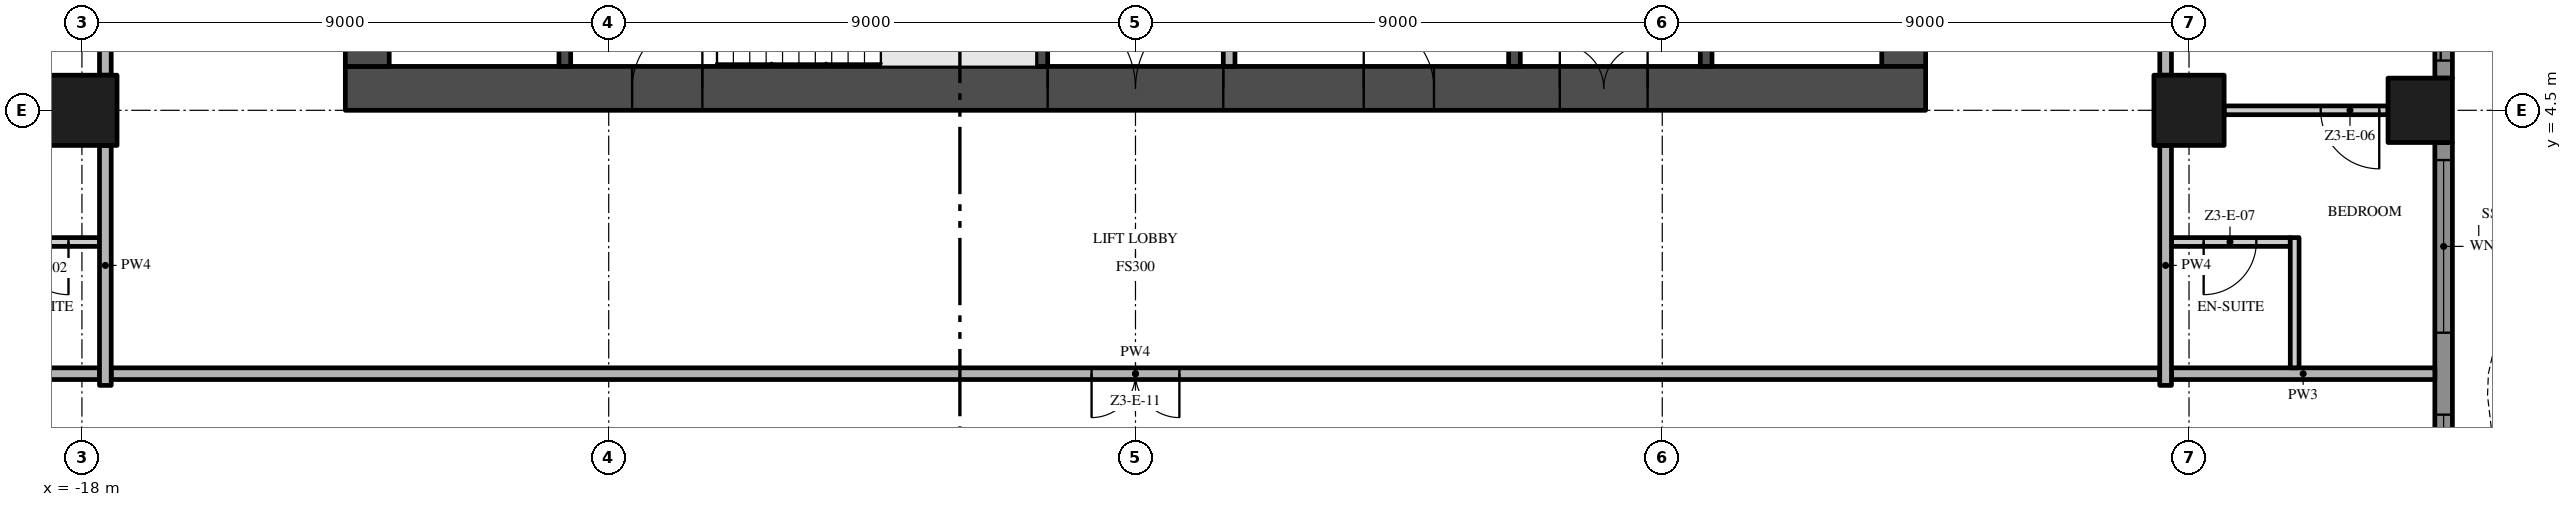
"""IFC4 building model, lengths in metres.
Left out: names, types, materials, properties, quantities, classifications, styles, units other than length and angle.
Written with IfcOpenShell. Run it as: python <this file> out.ifc"""

import sys

from ifc_helpers import new_model, si_unit, direction, frame, frame_2d, origin, origin_2d, place, context, subcontext, project, spatial, polyline, rectangle, outline, extrude, element, fill, save


model = new_model("IFC4")
c1 = context("Model", 3, precision=1e-05, world=origin(), true_north=direction((0.0, 1.0)))
c2 = subcontext(c1, "Body", "Model", "MODEL_VIEW")
j1 = project(units=[si_unit("LENGTHUNIT", "METRE"), si_unit("PLANEANGLEUNIT", "RADIAN")], contexts=[c1])
p1 = place(None, origin())
s1 = spatial("IfcSite", under=j1, at=p1, CompositionType="ELEMENT")
p2 = place(p1, origin())
s2 = spatial("IfcBuilding", under=s1, at=p2, CompositionType="ELEMENT")
p3 = place(p2, frame((0.0, 0.0, 170.6)))
s3 = spatial("IfcBuildingStorey", under=s2, at=p3, CompositionType="ELEMENT", Elevation=170.6)
p4 = place(p3, frame((-13.5, 4.875, -0.3), z_axis=(0.0, 0.0, 1.0), x_axis=(1.0, 0.0, 0.0)))
e1 = element("IfcWall", 1, at=p4, inside=s3, PredefinedType="SHEAR", context=c2, shape_type="SweptSolid", body=[
    extrude(rectangle(XDim=27.0, YDim=0.75, at=frame_2d((13.5, 0.0))), origin(), (0.0, 0.0, 1.0), 3.8),
])
p5 = place(p4, frame((12.0, 0.0, 0.3)))
e2 = element("IfcOpeningElement", 2, at=p5, cuts=e1, PredefinedType="OPENING", context=c2, shape_type="SweptSolid", body=[
    extrude(rectangle(XDim=3.0, YDim=2.4, at=frame_2d((1.5, 1.2))), frame((0.0, 0.385, 0.0), z_axis=(0.0, -1.0, 0.0), x_axis=(1.0, 0.0, 0.0)), (0.0, 0.0, 1.0), 0.77),
])
p6 = place(p4, frame((4.9, 0.0, 0.3)))
e3 = element("IfcOpeningElement", 3, at=p6, cuts=e1, PredefinedType="OPENING", context=c2, shape_type="SweptSolid", body=[
    extrude(rectangle(XDim=1.2, YDim=2.2, at=frame_2d((0.6, 1.1))), frame((0.0, 0.385, 0.0), z_axis=(0.0, -1.0, 0.0), x_axis=(1.0, 0.0, 0.0)), (0.0, 0.0, 1.0), 0.77),
])
p7 = place(p4, frame((20.75, 0.0, 0.3)))
e4 = element("IfcOpeningElement", 4, at=p7, cuts=e1, PredefinedType="OPENING", context=c2, shape_type="SweptSolid", body=[
    extrude(rectangle(XDim=1.5, YDim=2.2, at=frame_2d((0.75, 1.1))), frame((0.0, 0.385, 0.0), z_axis=(0.0, -1.0, 0.0), x_axis=(1.0, 0.0, 0.0)), (0.0, 0.0, 1.0), 0.77),
])
p8 = place(p4, frame((17.4, 0.0, 0.3)))
e5 = element("IfcOpeningElement", 5, at=p8, cuts=e1, PredefinedType="OPENING", context=c2, shape_type="SweptSolid", body=[
    extrude(rectangle(XDim=1.2, YDim=2.2, at=frame_2d((0.6, 1.1))), frame((0.0, 0.385, 0.0), z_axis=(0.0, -1.0, 0.0), x_axis=(1.0, 0.0, 0.0)), (0.0, 0.0, 1.0), 0.77),
])
p9 = place(p3, frame((13.125, 5.25, -0.3), z_axis=(0.0, 0.0, 1.0), x_axis=(0.0, 1.0, 0.0)))
e6 = element("IfcWall", 6, at=p9, inside=s3, PredefinedType="SHEAR", context=c2, shape_type="SweptSolid", body=[
    extrude(rectangle(XDim=16.5, YDim=0.75, at=frame_2d((8.25, 0.0))), origin(), (0.0, 0.0, 1.0), 3.8),
])
p10 = place(p9, frame((6.15, 0.0, 0.3)))
e7 = element("IfcOpeningElement", 7, at=p10, cuts=e6, PredefinedType="OPENING", context=c2, shape_type="SweptSolid", body=[
    extrude(rectangle(XDim=1.2, YDim=2.2, at=frame_2d((0.6, 1.1))), frame((0.0, 0.385, 0.0), z_axis=(0.0, -1.0, 0.0), x_axis=(1.0, 0.0, 0.0)), (0.0, 0.0, 1.0), 0.77),
])
p11 = place(p3, frame((-13.125, 21.75, -0.3), z_axis=(0.0, 0.0, 1.0), x_axis=(0.0, -1.0, 0.0)))
e8 = element("IfcWall", 8, at=p11, inside=s3, PredefinedType="SHEAR", context=c2, shape_type="SweptSolid", body=[
    extrude(rectangle(XDim=16.5, YDim=0.75, at=frame_2d((8.25, 0.0))), origin(), (0.0, 0.0, 1.0), 3.8),
])
p12 = place(p11, frame((9.15, 0.0, 0.3)))
e9 = element("IfcOpeningElement", 9, at=p12, cuts=e8, PredefinedType="OPENING", context=c2, shape_type="SweptSolid", body=[
    extrude(rectangle(XDim=1.2, YDim=2.2, at=frame_2d((0.6, 1.1))), frame((0.0, 0.385, 0.0), z_axis=(0.0, -1.0, 0.0), x_axis=(1.0, 0.0, 0.0)), (0.0, 0.0, 1.0), 0.77),
])
for number, where, z_axis, x_axis in (
    (10, (-18.0, 4.5, 0.0), (0.0, 0.0, 1.0), (1.0, 0.0, 0.0)),
    (11, (18.0, 4.5, 0.0), (0.0, 0.0, 1.0), (1.0, 0.0, 0.0)),
):
    element("IfcColumn", number, at=place(p3, frame(where, z_axis=z_axis, x_axis=x_axis)), inside=s3, PredefinedType="COLUMN", context=c2, shape_type="SweptSolid", body=[
        extrude(rectangle(XDim=1.2, YDim=1.2, at=origin_2d()), origin(), (0.0, 0.0, 1.0), 3.5),
    ])
p13 = place(p3, frame((21.95, 4.5, 0.0), z_axis=(0.0, 0.0, 1.0), x_axis=(1.0, 0.0, 0.0)))
e12 = element("IfcColumn", 12, at=p13, inside=s3, PredefinedType="COLUMN", context=c2, shape_type="SweptSolid", body=[
    extrude(rectangle(XDim=1.1, YDim=1.1, at=origin_2d()), origin(), (0.0, 0.0, 1.0), 3.5),
])
p14 = place(p3, frame((22.35, 3.95, 0.0), z_axis=(0.0, 0.0, 1.0), x_axis=(0.0, -1.0, 0.0)))
e13 = element("IfcWall", 13, at=p14, inside=s3, PredefinedType="SOLIDWALL", context=c2, shape_type="SweptSolid", body=[
    extrude(rectangle(XDim=7.9, YDim=0.3, at=frame_2d((3.95, 0.0))), origin(), (0.0, 0.0, 1.0), 3.5),
])
p15 = place(p14, frame((4.65, 0.0, 0.45)))
e14 = element("IfcOpeningElement", 14, at=p15, cuts=e13, PredefinedType="OPENING", context=c2, shape_type="SweptSolid", body=[
    extrude(rectangle(XDim=2.95, YDim=2.65, at=frame_2d((1.475, 1.325))), frame((0.0, 0.16, 0.0), z_axis=(0.0, -1.0, 0.0), x_axis=(1.0, 0.0, 0.0)), (0.0, 0.0, 1.0), 0.32),
])
p16 = place(p14, frame((0.3, 0.0, 0.45)))
e15 = element("IfcOpeningElement", 15, at=p16, cuts=e13, PredefinedType="OPENING", context=c2, shape_type="SweptSolid", body=[
    extrude(rectangle(XDim=2.95, YDim=2.65, at=frame_2d((1.475, 1.325))), frame((0.0, 0.16, 0.0), z_axis=(0.0, -1.0, 0.0), x_axis=(1.0, 0.0, 0.0)), (0.0, 0.0, 1.0), 0.32),
])
p17 = place(p3, frame((22.35, 12.95, 0.0), z_axis=(0.0, 0.0, 1.0), x_axis=(0.0, -1.0, 0.0)))
e16 = element("IfcWall", 16, at=p17, inside=s3, PredefinedType="SOLIDWALL", context=c2, shape_type="SweptSolid", body=[
    extrude(rectangle(XDim=7.9, YDim=0.3, at=frame_2d((3.95, 0.0))), origin(), (0.0, 0.0, 1.0), 3.5),
])
p18 = place(p17, frame((4.65, 0.0, 0.0)))
e17 = element("IfcOpeningElement", 17, at=p18, cuts=e16, PredefinedType="OPENING", context=c2, shape_type="SweptSolid", body=[
    extrude(rectangle(XDim=2.95, YDim=2.4, at=frame_2d((1.475, 1.2))), frame((0.0, 0.16, 0.0), z_axis=(0.0, -1.0, 0.0), x_axis=(1.0, 0.0, 0.0)), (0.0, 0.0, 1.0), 0.32),
])
p19 = place(p17, frame((0.3, 0.0, 0.45)))
e18 = element("IfcOpeningElement", 18, at=p19, cuts=e16, PredefinedType="OPENING", context=c2, shape_type="SweptSolid", body=[
    extrude(rectangle(XDim=2.95, YDim=2.65, at=frame_2d((1.475, 1.325))), frame((0.0, 0.16, 0.0), z_axis=(0.0, -1.0, 0.0), x_axis=(1.0, 0.0, 0.0)), (0.0, 0.0, 1.0), 0.32),
])
p20 = place(p3, origin())
e19 = element("IfcWall", 19, at=p20, inside=s3, PredefinedType="USERDEFINED", context=c2, shape_type="SweptSolid", body=[
    extrude(outline(polyline([(23.451, -13.5), (24.112, -12.0), (24.845, -10.5), (25.369, -9.0), (25.5, -7.875), (25.485, -7.5), (25.149, -6.0), (24.488, -4.5), (23.755, -3.0), (23.231, -1.5), (23.1, -0.375), (23.115, 0.0), (23.451, 1.5), (24.112, 3.0), (24.845, 4.5), (25.369, 6.0), (25.5, 7.125), (25.485, 7.5), (25.149, 9.0), (24.488, 10.5), (23.755, 12.0), (23.231, 13.5), (23.1, 14.625), (23.115, 15.0), (23.451, 16.5), (24.112, 18.0), (23.883, 18.101), (23.213, 16.579), (22.866, 15.033), (22.849, 14.615), (22.986, 13.444), (23.524, 11.904), (24.261, 10.395), (24.91, 8.921), (25.236, 7.467), (25.249, 7.135), (25.124, 6.056), (24.614, 4.596), (23.885, 3.105), (23.213, 1.579), (22.866, 0.033), (22.849, -0.385), (22.986, -1.556), (23.524, -3.096), (24.261, -4.605), (24.91, -6.079), (25.236, -7.533), (25.249, -7.865), (25.124, -8.944), (24.614, -10.404), (23.885, -11.895), (23.223, -13.399), (23.451, -13.5)])), origin(), (0.0, 0.0, 1.0), 0.9),
])
for number, where, z_axis, x_axis in (
    (20, (-9.75, 5.25, 0.0), (0.0, 0.0, 1.0), (0.0, 1.0, 0.0)),
    (21, (-1.6, 5.25, 0.0), (0.0, 0.0, 1.0), (0.0, 1.0, 0.0)),
):
    element("IfcWall", number, at=place(p3, frame(where, z_axis=z_axis, x_axis=x_axis)), inside=s3, PredefinedType="SHEAR", context=c2, shape_type="SweptSolid", body=[
        extrude(rectangle(XDim=2.7, YDim=0.2, at=frame_2d((1.35, 0.0))), origin(), (0.0, 0.0, 1.0), 3.5),
    ])
p21 = place(p3, frame((1.6, 7.5, 0.0), z_axis=(0.0, 0.0, 1.0), x_axis=(0.0, -1.0, 0.0)))
e22 = element("IfcWall", 22, at=p21, inside=s3, PredefinedType="PARTITIONING", context=c2, shape_type="SweptSolid", body=[
    extrude(rectangle(XDim=2.25, YDim=0.2, at=frame_2d((1.125, 0.0))), origin(), (0.0, 0.0, 1.0), 3.5),
])
p22 = place(p21, frame((0.275, 0.0, 0.0)))
e23 = element("IfcOpeningElement", 23, at=p22, cuts=e22, PredefinedType="OPENING", context=c2, shape_type="SweptSolid", body=[
    extrude(rectangle(XDim=0.9, YDim=2.1, at=frame_2d((0.45, 1.05))), frame((0.0, 0.11, 0.0), z_axis=(0.0, -1.0, 0.0), x_axis=(1.0, 0.0, 0.0)), (0.0, 0.0, 1.0), 0.22),
])
p23 = place(p3, frame((6.475, 5.25, 0.0), z_axis=(0.0, 0.0, 1.0), x_axis=(0.0, 1.0, 0.0)))
e24 = element("IfcWall", 24, at=p23, inside=s3, PredefinedType="SHEAR", context=c2, shape_type="SweptSolid", body=[
    extrude(rectangle(XDim=2.25, YDim=0.2, at=frame_2d((1.125, 0.0))), origin(), (0.0, 0.0, 1.0), 3.5),
])
p24 = place(p3, frame((9.75, 5.25, 0.0), z_axis=(0.0, 0.0, 1.0), x_axis=(0.0, 1.0, 0.0)))
e25 = element("IfcWall", 25, at=p24, inside=s3, PredefinedType="SHEAR", context=c2, shape_type="SweptSolid", body=[
    extrude(rectangle(XDim=2.35, YDim=0.2, at=frame_2d((1.175, 0.0))), origin(), (0.0, 0.0, 1.0), 3.5),
])
p25 = place(p24, frame((0.7, 0.0, 0.0)))
e26 = element("IfcOpeningElement", 26, at=p25, cuts=e25, PredefinedType="OPENING", context=c2, shape_type="SweptSolid", body=[
    extrude(rectangle(XDim=1.1, YDim=2.1, at=frame_2d((0.55, 1.05))), frame((0.0, 0.11, 0.0), z_axis=(0.0, -1.0, 0.0), x_axis=(1.0, 0.0, 0.0)), (0.0, 0.0, 1.0), 0.22),
])
p26 = place(p3, frame((17.5, 0.0, 0.0), z_axis=(0.0, 0.0, 1.0), x_axis=(-1.0, 0.0, 0.0)))
e27 = element("IfcWall", 27, at=p26, inside=s3, PredefinedType="PARTITIONING", context=c2, shape_type="SweptSolid", body=[
    extrude(rectangle(XDim=35.0, YDim=0.2, at=frame_2d((17.5, 0.0))), origin(), (0.0, 0.0, 1.0), 3.5),
])
p27 = place(p26, frame((16.75, 0.0, 0.0)))
e28 = element("IfcOpeningElement", 28, at=p27, cuts=e27, PredefinedType="OPENING", context=c2, shape_type="SweptSolid", body=[
    extrude(rectangle(XDim=1.5, YDim=2.4, at=frame_2d((0.75, 1.2))), frame((0.0, 0.11, 0.0), z_axis=(0.0, -1.0, 0.0), x_axis=(1.0, 0.0, 0.0)), (0.0, 0.0, 1.0), 0.22),
])
for number, where, z_axis, x_axis in (
    (29, (-22.2, 0.0, 0.0), (0.0, 0.0, 1.0), (1.0, 0.0, 0.0)),
    (30, (17.7, 0.0, 0.0), (0.0, 0.0, 1.0), (1.0, 0.0, 0.0)),
):
    element("IfcWall", number, at=place(p3, frame(where, z_axis=z_axis, x_axis=x_axis)), inside=s3, PredefinedType="PARTITIONING", context=c2, shape_type="SweptSolid", body=[
        extrude(rectangle(XDim=4.5, YDim=0.2, at=frame_2d((2.25, 0.0))), origin(), (0.0, 0.0, 1.0), 3.5),
    ])
p28 = place(p3, frame((-17.7, 2.25, 0.0), z_axis=(0.0, 0.0, 1.0), x_axis=(-1.0, 0.0, 0.0)))
e31 = element("IfcWall", 31, at=p28, inside=s3, PredefinedType="PARTITIONING", context=c2, shape_type="SweptSolid", body=[
    extrude(rectangle(XDim=2.03, YDim=0.15, at=frame_2d((1.015, 0.0))), origin(), (0.0, 0.0, 1.0), 3.5),
])
p29 = place(p28, frame((0.53, 0.0, 0.0)))
e32 = element("IfcOpeningElement", 32, at=p29, cuts=e31, PredefinedType="OPENING", context=c2, shape_type="SweptSolid", body=[
    extrude(rectangle(XDim=0.9, YDim=2.1, at=frame_2d((0.45, 1.05))), frame((0.0, 0.085, 0.0), z_axis=(0.0, -1.0, 0.0), x_axis=(1.0, 0.0, 0.0)), (0.0, 0.0, 1.0), 0.17),
])
p30 = place(p3, frame((19.73, 2.25, 0.0), z_axis=(0.0, 0.0, 1.0), x_axis=(-1.0, 0.0, 0.0)))
e33 = element("IfcWall", 33, at=p30, inside=s3, PredefinedType="PARTITIONING", context=c2, shape_type="SweptSolid", body=[
    extrude(rectangle(XDim=2.03, YDim=0.15, at=frame_2d((1.015, 0.0))), origin(), (0.0, 0.0, 1.0), 3.5),
])
p31 = place(p30, frame((0.58, 0.0, 0.0)))
e34 = element("IfcOpeningElement", 34, at=p31, cuts=e33, PredefinedType="OPENING", context=c2, shape_type="SweptSolid", body=[
    extrude(rectangle(XDim=0.9, YDim=2.1, at=frame_2d((0.45, 1.05))), frame((0.0, 0.085, 0.0), z_axis=(0.0, -1.0, 0.0), x_axis=(1.0, 0.0, 0.0)), (0.0, 0.0, 1.0), 0.17),
])
p32 = place(p3, frame((21.4, 4.5, 0.0), z_axis=(0.0, 0.0, 1.0), x_axis=(-1.0, 0.0, 0.0)))
e35 = element("IfcWall", 35, at=p32, inside=s3, PredefinedType="PARTITIONING", context=c2, shape_type="SweptSolid", body=[
    extrude(rectangle(XDim=2.8, YDim=0.15, at=frame_2d((1.4, 0.0))), origin(), (0.0, 0.0, 1.0), 3.5),
])
p33 = place(p32, frame((0.15, 0.0, 0.0)))
e36 = element("IfcOpeningElement", 36, at=p33, cuts=e35, PredefinedType="OPENING", context=c2, shape_type="SweptSolid", body=[
    extrude(rectangle(XDim=1.0, YDim=2.4, at=frame_2d((0.5, 1.2))), frame((0.0, 0.085, 0.0), z_axis=(0.0, -1.0, 0.0), x_axis=(1.0, 0.0, 0.0)), (0.0, 0.0, 1.0), 0.17),
])
p34 = place(p3, frame((-17.6, -0.2, 0.0), z_axis=(0.0, 0.0, 1.0), x_axis=(0.0, 1.0, 0.0)))
e37 = element("IfcWall", 37, at=p34, inside=s3, PredefinedType="PARTITIONING", context=c2, shape_type="SweptSolid", body=[
    extrude(rectangle(XDim=4.1, YDim=0.2, at=frame_2d((2.05, 0.0))), origin(), (0.0, 0.0, 1.0), 3.5),
])
p35 = place(p3, frame((-17.6, 5.1, 0.0), z_axis=(0.0, 0.0, 1.0), x_axis=(0.0, 1.0, 0.0)))
e38 = element("IfcWall", 38, at=p35, inside=s3, PredefinedType="PARTITIONING", context=c2, shape_type="SweptSolid", body=[
    extrude(rectangle(XDim=7.8, YDim=0.2, at=frame_2d((3.9, 0.0))), origin(), (0.0, 0.0, 1.0), 3.5),
])
p36 = place(p35, frame((1.05, 0.0, 0.0)))
e39 = element("IfcOpeningElement", 39, at=p36, cuts=e38, PredefinedType="OPENING", context=c2, shape_type="SweptSolid", body=[
    extrude(rectangle(XDim=1.2, YDim=2.4, at=frame_2d((0.6, 1.2))), frame((0.0, 0.11, 0.0), z_axis=(0.0, -1.0, 0.0), x_axis=(1.0, 0.0, 0.0)), (0.0, 0.0, 1.0), 0.22),
])
p37 = place(p3, frame((17.6, -0.2, 0.0), z_axis=(0.0, 0.0, 1.0), x_axis=(0.0, 1.0, 0.0)))
e40 = element("IfcWall", 40, at=p37, inside=s3, PredefinedType="PARTITIONING", context=c2, shape_type="SweptSolid", body=[
    extrude(rectangle(XDim=4.1, YDim=0.2, at=frame_2d((2.05, 0.0))), origin(), (0.0, 0.0, 1.0), 3.5),
])
p38 = place(p3, frame((17.6, 12.9, 0.0), z_axis=(0.0, 0.0, 1.0), x_axis=(0.0, -1.0, 0.0)))
e41 = element("IfcWall", 41, at=p38, inside=s3, PredefinedType="PARTITIONING", context=c2, shape_type="SweptSolid", body=[
    extrude(rectangle(XDim=7.8, YDim=0.2, at=frame_2d((3.9, 0.0))), origin(), (0.0, 0.0, 1.0), 3.5),
])
p39 = place(p38, frame((5.55, 0.0, 0.0)))
e42 = element("IfcOpeningElement", 42, at=p39, cuts=e41, PredefinedType="OPENING", context=c2, shape_type="SweptSolid", body=[
    extrude(rectangle(XDim=1.2, YDim=2.4, at=frame_2d((0.6, 1.2))), frame((0.0, 0.11, 0.0), z_axis=(0.0, -1.0, 0.0), x_axis=(1.0, 0.0, 0.0)), (0.0, 0.0, 1.0), 0.22),
])
p40 = place(p3, frame((19.805, 0.1, 0.0), z_axis=(0.0, 0.0, 1.0), x_axis=(0.0, 1.0, 0.0)))
e43 = element("IfcWall", 43, at=p40, inside=s3, PredefinedType="PARTITIONING", context=c2, shape_type="SweptSolid", body=[
    extrude(rectangle(XDim=2.225, YDim=0.15, at=frame_2d((1.113, 0.0))), origin(), (0.0, 0.0, 1.0), 3.5),
])
p41 = place(p15, origin())
e44 = element("IfcWindow", 44, at=p41, inside=s3, PartitioningType="SINGLE_PANEL", PredefinedType="WINDOW", context=c2, shape_type="SweptSolid", body=[
    extrude(rectangle(XDim=2.95, YDim=2.65, at=frame_2d((1.475, 1.325))), frame((0.0, 0.03, 0.0), z_axis=(0.0, -1.0, 0.0), x_axis=(1.0, 0.0, 0.0)), (0.0, 0.0, 1.0), 0.06),
])
fill(e14, e44)
p42 = place(p16, origin())
e45 = element("IfcWindow", 45, at=p42, inside=s3, PartitioningType="SINGLE_PANEL", PredefinedType="WINDOW", context=c2, shape_type="SweptSolid", body=[
    extrude(rectangle(XDim=2.95, YDim=2.65, at=frame_2d((1.475, 1.325))), frame((0.0, 0.03, 0.0), z_axis=(0.0, -1.0, 0.0), x_axis=(1.0, 0.0, 0.0)), (0.0, 0.0, 1.0), 0.06),
])
fill(e15, e45)
p43 = place(p18, origin())
e46 = element("IfcDoor", 46, at=p43, inside=s3, OperationType="SINGLE_SWING_LEFT", PredefinedType="DOOR", context=c2, shape_type="SweptSolid", body=[
    extrude(rectangle(XDim=2.95, YDim=2.4, at=frame_2d((1.475, 1.2))), frame((0.0, 0.025, 0.0), z_axis=(0.0, -1.0, 0.0), x_axis=(1.0, 0.0, 0.0)), (0.0, 0.0, 1.0), 0.05),
])
fill(e17, e46)
p44 = place(p5, frame((3.0, 0.0, 0.0), z_axis=(0.0, 0.0, 1.0), x_axis=(-1.0, 0.0, 0.0)))
e47 = element("IfcDoor", 47, at=p44, inside=s3, OperationType="DOUBLE_DOOR_SINGLE_SWING", PredefinedType="DOOR", context=c2, shape_type="SweptSolid", body=[
    extrude(rectangle(XDim=3.0, YDim=2.4, at=frame_2d((1.5, 1.2))), frame((0.0, 0.025, 0.0), z_axis=(0.0, -1.0, 0.0), x_axis=(1.0, 0.0, 0.0)), (0.0, 0.0, 1.0), 0.05),
])
fill(e2, e47)
p45 = place(p6, frame((1.2, 0.0, 0.0), z_axis=(0.0, 0.0, 1.0), x_axis=(-1.0, 0.0, 0.0)))
e48 = element("IfcDoor", 48, at=p45, inside=s3, OperationType="SINGLE_SWING_LEFT", PredefinedType="DOOR", context=c2, shape_type="SweptSolid", body=[
    extrude(rectangle(XDim=1.2, YDim=2.2, at=frame_2d((0.6, 1.1))), frame((0.0, 0.025, 0.0), z_axis=(0.0, -1.0, 0.0), x_axis=(1.0, 0.0, 0.0)), (0.0, 0.0, 1.0), 0.05),
])
fill(e3, e48)
p46 = place(p7, frame((1.5, 0.0, 0.0), z_axis=(0.0, 0.0, 1.0), x_axis=(-1.0, 0.0, 0.0)))
e49 = element("IfcDoor", 49, at=p46, inside=s3, OperationType="DOUBLE_DOOR_SINGLE_SWING", PredefinedType="DOOR", context=c2, shape_type="SweptSolid", body=[
    extrude(rectangle(XDim=1.5, YDim=2.2, at=frame_2d((0.75, 1.1))), frame((0.0, 0.025, 0.0), z_axis=(0.0, -1.0, 0.0), x_axis=(1.0, 0.0, 0.0)), (0.0, 0.0, 1.0), 0.05),
])
fill(e4, e49)
p47 = place(p8, frame((1.2, 0.0, 0.0), z_axis=(0.0, 0.0, 1.0), x_axis=(-1.0, 0.0, 0.0)))
e50 = element("IfcDoor", 50, at=p47, inside=s3, OperationType="SINGLE_SWING_RIGHT", PredefinedType="DOOR", context=c2, shape_type="SweptSolid", body=[
    extrude(rectangle(XDim=1.2, YDim=2.2, at=frame_2d((0.6, 1.1))), frame((0.0, 0.025, 0.0), z_axis=(0.0, -1.0, 0.0), x_axis=(1.0, 0.0, 0.0)), (0.0, 0.0, 1.0), 0.05),
])
fill(e5, e50)
p48 = place(p29, origin())
e51 = element("IfcDoor", 51, at=p48, inside=s3, OperationType="SINGLE_SWING_LEFT", PredefinedType="DOOR", context=c2, shape_type="SweptSolid", body=[
    extrude(rectangle(XDim=0.9, YDim=2.1, at=frame_2d((0.45, 1.05))), frame((0.0, 0.025, 0.0), z_axis=(0.0, -1.0, 0.0), x_axis=(1.0, 0.0, 0.0)), (0.0, 0.0, 1.0), 0.05),
])
fill(e32, e51)
p49 = place(p33, origin())
e52 = element("IfcDoor", 52, at=p49, inside=s3, OperationType="SINGLE_SWING_LEFT", PredefinedType="DOOR", context=c2, shape_type="SweptSolid", body=[
    extrude(rectangle(XDim=1.0, YDim=2.4, at=frame_2d((0.5, 1.2))), frame((0.0, 0.025, 0.0), z_axis=(0.0, -1.0, 0.0), x_axis=(1.0, 0.0, 0.0)), (0.0, 0.0, 1.0), 0.05),
])
fill(e36, e52)
p50 = place(p31, origin())
e53 = element("IfcDoor", 53, at=p50, inside=s3, OperationType="SINGLE_SWING_RIGHT", PredefinedType="DOOR", context=c2, shape_type="SweptSolid", body=[
    extrude(rectangle(XDim=0.9, YDim=2.1, at=frame_2d((0.45, 1.05))), frame((0.0, 0.025, 0.0), z_axis=(0.0, -1.0, 0.0), x_axis=(1.0, 0.0, 0.0)), (0.0, 0.0, 1.0), 0.05),
])
fill(e34, e53)
p51 = place(p27, origin())
e54 = element("IfcDoor", 54, at=p51, inside=s3, OperationType="DOUBLE_DOOR_SINGLE_SWING", PredefinedType="DOOR", context=c2, shape_type="SweptSolid", body=[
    extrude(rectangle(XDim=1.5, YDim=2.4, at=frame_2d((0.75, 1.2))), frame((0.0, 0.025, 0.0), z_axis=(0.0, -1.0, 0.0), x_axis=(1.0, 0.0, 0.0)), (0.0, 0.0, 1.0), 0.05),
])
fill(e28, e54)
save(model, sys.argv[1])
